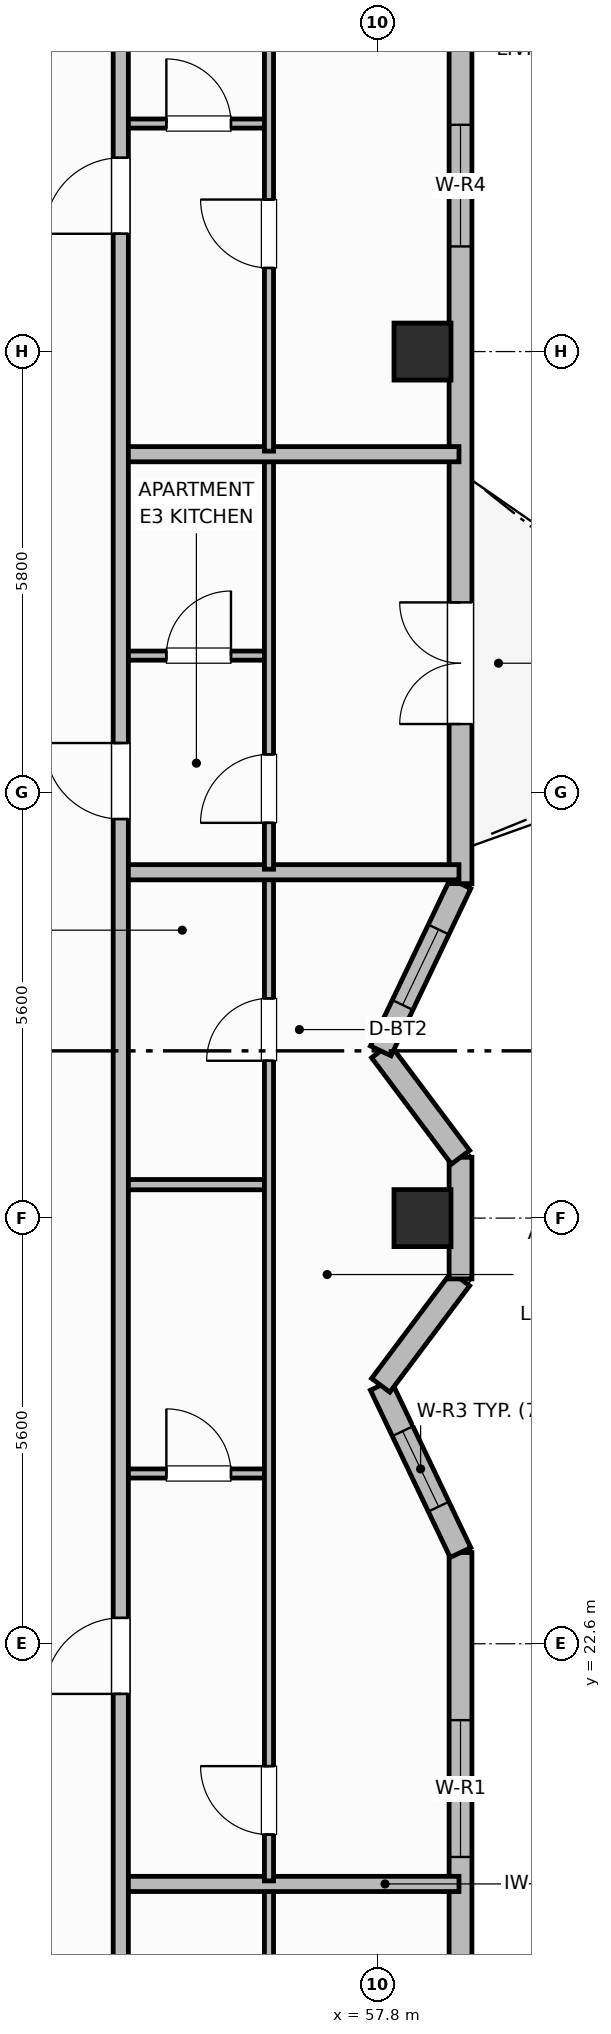
"""IFC4 building model, lengths in metres.
Left out: names, types, materials, properties, quantities, classifications, styles, units other than length and angle.
Written with IfcOpenShell. Run it as: python <this file> out.ifc"""

import sys

from ifc_helpers import new_model, si_unit, direction, frame, frame_2d, origin, origin_2d, place, context, subcontext, project, spatial, rectangle, extrude, element, fill, save


model = new_model("IFC4")
c1 = context("Model", 3, precision=1e-05, world=origin(), true_north=direction((0.0, 1.0)))
c2 = subcontext(c1, "Body", "Model", "MODEL_VIEW")
j1 = project(units=[si_unit("LENGTHUNIT", "METRE"), si_unit("PLANEANGLEUNIT", "RADIAN")], contexts=[c1])
p1 = place(None, origin())
s1 = spatial("IfcSite", under=j1, at=p1, CompositionType="ELEMENT")
p2 = place(p1, origin())
s2 = spatial("IfcBuilding", under=s1, at=p2, CompositionType="ELEMENT")
p3 = place(p2, frame((0.0, 0.0, 275.0)))
s3 = spatial("IfcBuildingStorey", under=s2, at=p3, CompositionType="ELEMENT", Elevation=275.0)
for number, where, z_axis, x_axis in (
    (1, (58.39, 28.2, 0.0), (0.0, 0.0, 1.0), (1.0, 0.0, 0.0)),
    (2, (58.39, 39.6, 0.0), (0.0, 0.0, 1.0), (1.0, 0.0, 0.0)),
):
    element("IfcColumn", number, at=place(p3, frame(where, z_axis=z_axis, x_axis=x_axis)), inside=s3, PredefinedType="COLUMN", context=c2, shape_type="SweptSolid", body=[
        extrude(rectangle(XDim=0.75, YDim=0.75, at=origin_2d()), origin(), (0.0, 0.0, 1.0), 3.7),
    ])
p4 = place(p3, frame((58.89, 12.68, 0.0), z_axis=(0.0, 0.0, 1.0), x_axis=(0.0, 1.0, 0.0)))
e3 = element("IfcWall", 3, at=p4, inside=s3, PredefinedType="SOLIDWALL", context=c2, shape_type="SweptSolid", body=[
    extrude(rectangle(XDim=11.12, YDim=0.3, at=frame_2d((5.56, 0.0))), origin(), (0.0, 0.0, 1.0), 2.73),
])
p5 = place(p4, frame((1.32, 0.0, 0.72)))
e4 = element("IfcOpeningElement", 4, at=p5, cuts=e3, PredefinedType="OPENING", context=c2, shape_type="SweptSolid", body=[
    extrude(rectangle(XDim=1.4, YDim=1.85, at=frame_2d((0.7, 0.925))), frame((0.0, 0.16, 0.0), z_axis=(0.0, -1.0, 0.0), x_axis=(1.0, 0.0, 0.0)), (0.0, 0.0, 1.0), 0.32),
])
p6 = place(p4, frame((7.115, 0.0, 0.76)))
e5 = element("IfcOpeningElement", 5, at=p6, cuts=e3, PredefinedType="OPENING", context=c2, shape_type="SweptSolid", body=[
    extrude(rectangle(XDim=1.8, YDim=1.85, at=frame_2d((0.9, 0.925))), frame((0.0, 0.16, 0.0), z_axis=(0.0, -1.0, 0.0), x_axis=(1.0, 0.0, 0.0)), (0.0, 0.0, 1.0), 0.32),
])
p7 = place(p3, frame((58.89, 23.8, 0.0), z_axis=(0.0, 0.0, 1.0), x_axis=(-0.430672112392, 0.902508466225, 0.0)))
e6 = element("IfcWall", 6, at=p7, inside=s3, PredefinedType="SOLIDWALL", context=c2, shape_type="SweptSolid", body=[
    extrude(rectangle(XDim=2.438, YDim=0.3, at=frame_2d((1.219, 0.0))), origin(), (0.0, 0.0, 1.0), 2.73),
])
p8 = place(p7, frame((0.669, 0.0, 0.92)))
e7 = element("IfcOpeningElement", 7, at=p8, cuts=e6, PredefinedType="OPENING", context=c2, shape_type="SweptSolid", body=[
    extrude(rectangle(XDim=1.1, YDim=1.65, at=frame_2d((0.55, 0.825))), frame((0.0, 0.16, 0.0), z_axis=(0.0, -1.0, 0.0), x_axis=(1.0, 0.0, 0.0)), (0.0, 0.0, 1.0), 0.32),
])
p9 = place(p3, frame((57.84, 26.0, 0.0), z_axis=(0.0, 0.0, 1.0), x_axis=(0.599955351225, 0.800033484634, 0.0)))
e8 = element("IfcWall", 8, at=p9, inside=s3, PredefinedType="SOLIDWALL", context=c2, shape_type="SweptSolid", body=[
    extrude(rectangle(XDim=1.75, YDim=0.3, at=frame_2d((0.875, 0.0))), origin(), (0.0, 0.0, 1.0), 2.73),
])
p10 = place(p3, frame((58.89, 27.4, 0.0), z_axis=(0.0, 0.0, 1.0), x_axis=(0.0, 1.0, 0.0)))
e9 = element("IfcWall", 9, at=p10, inside=s3, PredefinedType="SOLIDWALL", context=c2, shape_type="SweptSolid", body=[
    extrude(rectangle(XDim=1.6, YDim=0.3, at=frame_2d((0.8, 0.0))), origin(), (0.0, 0.0, 1.0), 2.73),
])
p11 = place(p3, frame((58.89, 29.0, 0.0), z_axis=(0.0, 0.0, 1.0), x_axis=(-0.599955351225, 0.800033484634, 0.0)))
e10 = element("IfcWall", 10, at=p11, inside=s3, PredefinedType="SOLIDWALL", context=c2, shape_type="SweptSolid", body=[
    extrude(rectangle(XDim=1.75, YDim=0.3, at=frame_2d((0.875, 0.0))), origin(), (0.0, 0.0, 1.0), 2.73),
])
p12 = place(p3, frame((57.84, 30.4, 0.0), z_axis=(0.0, 0.0, 1.0), x_axis=(0.430633186234, 0.902527040544, 0.0)))
e11 = element("IfcWall", 11, at=p12, inside=s3, PredefinedType="SOLIDWALL", context=c2, shape_type="SweptSolid", body=[
    extrude(rectangle(XDim=2.438, YDim=0.3, at=frame_2d((1.219, 0.0))), origin(), (0.0, 0.0, 1.0), 2.73),
])
p13 = place(p12, frame((0.669, 0.0, 0.92)))
e12 = element("IfcOpeningElement", 12, at=p13, cuts=e11, PredefinedType="OPENING", context=c2, shape_type="SweptSolid", body=[
    extrude(rectangle(XDim=1.1, YDim=1.65, at=frame_2d((0.55, 0.825))), frame((0.0, 0.16, 0.0), z_axis=(0.0, -1.0, 0.0), x_axis=(1.0, 0.0, 0.0)), (0.0, 0.0, 1.0), 0.32),
])
p14 = place(p3, frame((58.89, 32.6, 0.0), z_axis=(0.0, 0.0, 1.0), x_axis=(0.0, 1.0, 0.0)))
e13 = element("IfcWall", 13, at=p14, inside=s3, PredefinedType="SOLIDWALL", context=c2, shape_type="SweptSolid", body=[
    extrude(rectangle(XDim=11.12, YDim=0.3, at=frame_2d((5.56, 0.0))), origin(), (0.0, 0.0, 1.0), 2.73),
])
p15 = place(p14, frame((2.1, 0.0, 0.0)))
e14 = element("IfcOpeningElement", 14, at=p15, cuts=e13, PredefinedType="OPENING", context=c2, shape_type="SweptSolid", body=[
    extrude(rectangle(XDim=1.6, YDim=2.1, at=frame_2d((0.8, 1.05))), frame((0.0, 0.16, 0.0), z_axis=(0.0, -1.0, 0.0), x_axis=(1.0, 0.0, 0.0)), (0.0, 0.0, 1.0), 0.32),
])
p16 = place(p14, frame((8.383, 0.0, 0.71)))
e15 = element("IfcOpeningElement", 15, at=p16, cuts=e13, PredefinedType="OPENING", context=c2, shape_type="SweptSolid", body=[
    extrude(rectangle(XDim=1.6, YDim=1.9, at=frame_2d((0.8, 0.95))), frame((0.0, 0.16, 0.0), z_axis=(0.0, -1.0, 0.0), x_axis=(1.0, 0.0, 0.0)), (0.0, 0.0, 1.0), 0.32),
])
p17 = place(p3, frame((56.37, 9.99, 0.0), z_axis=(0.0, 0.0, 1.0), x_axis=(0.0, 1.0, 0.0)))
e16 = element("IfcWall", 16, at=p17, inside=s3, PredefinedType="PARTITIONING", context=c2, shape_type="SweptSolid", body=[
    extrude(rectangle(XDim=9.41, YDim=0.12, at=frame_2d((4.705, 0.0))), origin(), (0.0, 0.0, 1.0), 2.56),
])
p18 = place(p17, frame((0.41, 0.0, 0.0)))
e17 = element("IfcOpeningElement", 17, at=p18, cuts=e16, PredefinedType="OPENING", context=c2, shape_type="SweptSolid", body=[
    extrude(rectangle(XDim=0.9, YDim=2.1, at=frame_2d((0.45, 1.05))), frame((0.0, 0.07, 0.0), z_axis=(0.0, -1.0, 0.0), x_axis=(1.0, 0.0, 0.0)), (0.0, 0.0, 1.0), 0.14),
])
p19 = place(p3, frame((54.42, 19.44, 0.0), z_axis=(0.0, 0.0, 1.0), x_axis=(1.0, 0.0, 0.0)))
e18 = element("IfcWall", 18, at=p19, inside=s3, PredefinedType="PARTITIONING", context=c2, shape_type="SweptSolid", body=[
    extrude(rectangle(XDim=4.45, YDim=0.2, at=frame_2d((2.225, 0.0))), origin(), (0.0, 0.0, 1.0), 2.56),
])
p20 = place(p3, frame((54.42, 24.84, 0.0), z_axis=(0.0, 0.0, 1.0), x_axis=(1.0, 0.0, 0.0)))
e19 = element("IfcWall", 19, at=p20, inside=s3, PredefinedType="PARTITIONING", context=c2, shape_type="SweptSolid", body=[
    extrude(rectangle(XDim=1.95, YDim=0.12, at=frame_2d((0.975, 0.0))), origin(), (0.0, 0.0, 1.0), 2.56),
])
p21 = place(p20, frame((0.6, 0.0, 0.0)))
e20 = element("IfcOpeningElement", 20, at=p21, cuts=e19, PredefinedType="OPENING", context=c2, shape_type="SweptSolid", body=[
    extrude(rectangle(XDim=0.85, YDim=2.1, at=frame_2d((0.425, 1.05))), frame((0.0, 0.07, 0.0), z_axis=(0.0, -1.0, 0.0), x_axis=(1.0, 0.0, 0.0)), (0.0, 0.0, 1.0), 0.14),
])
p22 = place(p3, frame((54.42, 28.64, 0.0), z_axis=(0.0, 0.0, 1.0), x_axis=(1.0, 0.0, 0.0)))
e21 = element("IfcWall", 21, at=p22, inside=s3, PredefinedType="PARTITIONING", context=c2, shape_type="SweptSolid", body=[
    extrude(rectangle(XDim=1.95, YDim=0.135, at=frame_2d((0.975, 0.0))), origin(), (0.0, 0.0, 1.0), 2.56),
])
p23 = place(p3, frame((56.37, 19.48, 0.0), z_axis=(0.0, 0.0, 1.0), x_axis=(0.0, 1.0, 0.0)))
e22 = element("IfcWall", 22, at=p23, inside=s3, PredefinedType="PARTITIONING", context=c2, shape_type="SweptSolid", body=[
    extrude(rectangle(XDim=13.23, YDim=0.12, at=frame_2d((6.615, 0.0))), origin(), (0.0, 0.0, 1.0), 2.56),
])
p24 = place(p23, frame((0.61, 0.0, 0.0)))
e23 = element("IfcOpeningElement", 23, at=p24, cuts=e22, PredefinedType="OPENING", context=c2, shape_type="SweptSolid", body=[
    extrude(rectangle(XDim=0.9, YDim=2.1, at=frame_2d((0.45, 1.05))), frame((0.0, 0.07, 0.0), z_axis=(0.0, -1.0, 0.0), x_axis=(1.0, 0.0, 0.0)), (0.0, 0.0, 1.0), 0.14),
])
p25 = place(p23, frame((10.79, 0.0, 0.0)))
e24 = element("IfcOpeningElement", 24, at=p25, cuts=e22, PredefinedType="OPENING", context=c2, shape_type="SweptSolid", body=[
    extrude(rectangle(XDim=0.82, YDim=2.08, at=frame_2d((0.41, 1.04))), frame((0.0, 0.07, 0.0), z_axis=(0.0, -1.0, 0.0), x_axis=(1.0, 0.0, 0.0)), (0.0, 0.0, 1.0), 0.14),
])
p26 = place(p3, frame((54.42, 32.75, 0.0), z_axis=(0.0, 0.0, 1.0), x_axis=(1.0, 0.0, 0.0)))
e25 = element("IfcWall", 25, at=p26, inside=s3, PredefinedType="PARTITIONING", context=c2, shape_type="SweptSolid", body=[
    extrude(rectangle(XDim=4.45, YDim=0.2, at=frame_2d((2.225, 0.0))), origin(), (0.0, 0.0, 1.0), 2.56),
])
p27 = place(p3, frame((54.42, 35.6, 0.0), z_axis=(0.0, 0.0, 1.0), x_axis=(1.0, 0.0, 0.0)))
e26 = element("IfcWall", 26, at=p27, inside=s3, PredefinedType="PARTITIONING", context=c2, shape_type="SweptSolid", body=[
    extrude(rectangle(XDim=1.95, YDim=0.12, at=frame_2d((0.975, 0.0))), origin(), (0.0, 0.0, 1.0), 2.56),
])
p28 = place(p27, frame((0.6, 0.0, 0.0)))
e27 = element("IfcOpeningElement", 27, at=p28, cuts=e26, PredefinedType="OPENING", context=c2, shape_type="SweptSolid", body=[
    extrude(rectangle(XDim=0.85, YDim=2.1, at=frame_2d((0.425, 1.05))), frame((0.0, 0.07, 0.0), z_axis=(0.0, -1.0, 0.0), x_axis=(1.0, 0.0, 0.0)), (0.0, 0.0, 1.0), 0.14),
])
p29 = place(p3, frame((56.37, 32.79, 0.0), z_axis=(0.0, 0.0, 1.0), x_axis=(0.0, 1.0, 0.0)))
e28 = element("IfcWall", 28, at=p29, inside=s3, PredefinedType="PARTITIONING", context=c2, shape_type="SweptSolid", body=[
    extrude(rectangle(XDim=5.42, YDim=0.12, at=frame_2d((2.71, 0.0))), origin(), (0.0, 0.0, 1.0), 2.56),
])
p30 = place(p29, frame((0.61, 0.0, 0.0)))
e29 = element("IfcOpeningElement", 29, at=p30, cuts=e28, PredefinedType="OPENING", context=c2, shape_type="SweptSolid", body=[
    extrude(rectangle(XDim=0.9, YDim=2.1, at=frame_2d((0.45, 1.05))), frame((0.0, 0.07, 0.0), z_axis=(0.0, -1.0, 0.0), x_axis=(1.0, 0.0, 0.0)), (0.0, 0.0, 1.0), 0.14),
])
p31 = place(p3, frame((54.42, 38.25, 0.0), z_axis=(0.0, 0.0, 1.0), x_axis=(1.0, 0.0, 0.0)))
e30 = element("IfcWall", 30, at=p31, inside=s3, PredefinedType="PARTITIONING", context=c2, shape_type="SweptSolid", body=[
    extrude(rectangle(XDim=4.45, YDim=0.2, at=frame_2d((2.225, 0.0))), origin(), (0.0, 0.0, 1.0), 2.56),
])
p32 = place(p3, frame((54.42, 42.6, 0.0), z_axis=(0.0, 0.0, 1.0), x_axis=(1.0, 0.0, 0.0)))
e31 = element("IfcWall", 31, at=p32, inside=s3, PredefinedType="PARTITIONING", context=c2, shape_type="SweptSolid", body=[
    extrude(rectangle(XDim=1.95, YDim=0.12, at=frame_2d((0.975, 0.0))), origin(), (0.0, 0.0, 1.0), 2.56),
])
p33 = place(p32, frame((0.6, 0.0, 0.0)))
e32 = element("IfcOpeningElement", 32, at=p33, cuts=e31, PredefinedType="OPENING", context=c2, shape_type="SweptSolid", body=[
    extrude(rectangle(XDim=0.85, YDim=2.1, at=frame_2d((0.425, 1.05))), frame((0.0, 0.07, 0.0), z_axis=(0.0, -1.0, 0.0), x_axis=(1.0, 0.0, 0.0)), (0.0, 0.0, 1.0), 0.14),
])
p34 = place(p3, frame((56.37, 38.29, 0.0), z_axis=(0.0, 0.0, 1.0), x_axis=(0.0, 1.0, 0.0)))
e33 = element("IfcWall", 33, at=p34, inside=s3, PredefinedType="PARTITIONING", context=c2, shape_type="SweptSolid", body=[
    extrude(rectangle(XDim=8.12, YDim=0.12, at=frame_2d((4.06, 0.0))), origin(), (0.0, 0.0, 1.0), 2.56),
])
p35 = place(p34, frame((2.41, 0.0, 0.0)))
e34 = element("IfcOpeningElement", 34, at=p35, cuts=e33, PredefinedType="OPENING", context=c2, shape_type="SweptSolid", body=[
    extrude(rectangle(XDim=0.9, YDim=2.1, at=frame_2d((0.45, 1.05))), frame((0.0, 0.07, 0.0), z_axis=(0.0, -1.0, 0.0), x_axis=(1.0, 0.0, 0.0)), (0.0, 0.0, 1.0), 0.14),
])
p36 = place(p3, frame((54.42, 9.95, 0.0), z_axis=(0.0, 0.0, 1.0), x_axis=(0.0, 1.0, 0.0)))
e35 = element("IfcWall", 35, at=p36, inside=s3, PredefinedType="PARTITIONING", context=c2, shape_type="SweptSolid", body=[
    extrude(rectangle(XDim=36.5, YDim=0.2, at=frame_2d((18.25, 0.0))), origin(), (0.0, 0.0, 1.0), 2.56),
])
p37 = place(p36, frame((3.11, 0.0, 0.0)))
e36 = element("IfcOpeningElement", 36, at=p37, cuts=e35, PredefinedType="OPENING", context=c2, shape_type="SweptSolid", body=[
    extrude(rectangle(XDim=1.0, YDim=2.15, at=frame_2d((0.5, 1.075))), frame((0.0, 0.11, 0.0), z_axis=(0.0, -1.0, 0.0), x_axis=(1.0, 0.0, 0.0)), (0.0, 0.0, 1.0), 0.22),
])
p38 = place(p36, frame((11.99, 0.0, 0.0)))
e37 = element("IfcOpeningElement", 37, at=p38, cuts=e35, PredefinedType="OPENING", context=c2, shape_type="SweptSolid", body=[
    extrude(rectangle(XDim=1.0, YDim=2.15, at=frame_2d((0.5, 1.075))), frame((0.0, 0.11, 0.0), z_axis=(0.0, -1.0, 0.0), x_axis=(1.0, 0.0, 0.0)), (0.0, 0.0, 1.0), 0.22),
])
p39 = place(p36, frame((23.5, 0.0, 0.0)))
e38 = element("IfcOpeningElement", 38, at=p39, cuts=e35, PredefinedType="OPENING", context=c2, shape_type="SweptSolid", body=[
    extrude(rectangle(XDim=1.0, YDim=2.15, at=frame_2d((0.5, 1.075))), frame((0.0, 0.11, 0.0), z_axis=(0.0, -1.0, 0.0), x_axis=(1.0, 0.0, 0.0)), (0.0, 0.0, 1.0), 0.22),
])
p40 = place(p36, frame((31.2, 0.0, 0.0)))
e39 = element("IfcOpeningElement", 39, at=p40, cuts=e35, PredefinedType="OPENING", context=c2, shape_type="SweptSolid", body=[
    extrude(rectangle(XDim=1.0, YDim=2.15, at=frame_2d((0.5, 1.075))), frame((0.0, 0.11, 0.0), z_axis=(0.0, -1.0, 0.0), x_axis=(1.0, 0.0, 0.0)), (0.0, 0.0, 1.0), 0.22),
])
p41 = place(p6, origin())
e40 = element("IfcWindow", 40, at=p41, inside=s3, PartitioningType="SINGLE_PANEL", PredefinedType="WINDOW", context=c2, shape_type="SweptSolid", body=[
    extrude(rectangle(XDim=1.8, YDim=1.85, at=frame_2d((0.9, 0.925))), frame((0.0, 0.03, 0.0), z_axis=(0.0, -1.0, 0.0), x_axis=(1.0, 0.0, 0.0)), (0.0, 0.0, 1.0), 0.06),
])
fill(e5, e40)
p42 = place(p8, origin())
e41 = element("IfcWindow", 41, at=p42, inside=s3, PartitioningType="SINGLE_PANEL", PredefinedType="WINDOW", context=c2, shape_type="SweptSolid", body=[
    extrude(rectangle(XDim=1.1, YDim=1.65, at=frame_2d((0.55, 0.825))), frame((0.0, 0.03, 0.0), z_axis=(0.0, -1.0, 0.0), x_axis=(1.0, 0.0, 0.0)), (0.0, 0.0, 1.0), 0.06),
])
fill(e7, e41)
p43 = place(p13, origin())
e42 = element("IfcWindow", 42, at=p43, inside=s3, PartitioningType="SINGLE_PANEL", PredefinedType="WINDOW", context=c2, shape_type="SweptSolid", body=[
    extrude(rectangle(XDim=1.1, YDim=1.65, at=frame_2d((0.55, 0.825))), frame((0.0, 0.03, 0.0), z_axis=(0.0, -1.0, 0.0), x_axis=(1.0, 0.0, 0.0)), (0.0, 0.0, 1.0), 0.06),
])
fill(e12, e42)
p44 = place(p15, origin())
e43 = element("IfcDoor", 43, at=p44, inside=s3, OperationType="DOUBLE_DOOR_SINGLE_SWING", PredefinedType="DOOR", context=c2, shape_type="SweptSolid", body=[
    extrude(rectangle(XDim=1.6, YDim=2.1, at=frame_2d((0.8, 1.05))), frame((0.0, 0.025, 0.0), z_axis=(0.0, -1.0, 0.0), x_axis=(1.0, 0.0, 0.0)), (0.0, 0.0, 1.0), 0.05),
])
fill(e14, e43)
p45 = place(p16, origin())
e44 = element("IfcWindow", 44, at=p45, inside=s3, PartitioningType="SINGLE_PANEL", PredefinedType="WINDOW", context=c2, shape_type="SweptSolid", body=[
    extrude(rectangle(XDim=1.6, YDim=1.9, at=frame_2d((0.8, 0.95))), frame((0.0, 0.03, 0.0), z_axis=(0.0, -1.0, 0.0), x_axis=(1.0, 0.0, 0.0)), (0.0, 0.0, 1.0), 0.06),
])
fill(e15, e44)
p46 = place(p21, origin())
e45 = element("IfcDoor", 45, at=p46, inside=s3, OperationType="SINGLE_SWING_LEFT", PredefinedType="DOOR", context=c2, shape_type="SweptSolid", body=[
    extrude(rectangle(XDim=0.85, YDim=2.1, at=frame_2d((0.425, 1.05))), frame((0.0, 0.025, 0.0), z_axis=(0.0, -1.0, 0.0), x_axis=(1.0, 0.0, 0.0)), (0.0, 0.0, 1.0), 0.05),
])
fill(e20, e45)
p47 = place(p24, origin())
e46 = element("IfcDoor", 46, at=p47, inside=s3, OperationType="SINGLE_SWING_RIGHT", PredefinedType="DOOR", context=c2, shape_type="SweptSolid", body=[
    extrude(rectangle(XDim=0.9, YDim=2.1, at=frame_2d((0.45, 1.05))), frame((0.0, 0.025, 0.0), z_axis=(0.0, -1.0, 0.0), x_axis=(1.0, 0.0, 0.0)), (0.0, 0.0, 1.0), 0.05),
])
fill(e23, e46)
p48 = place(p25, origin())
e47 = element("IfcDoor", 47, at=p48, inside=s3, OperationType="SINGLE_SWING_LEFT", PredefinedType="DOOR", context=c2, shape_type="SweptSolid", body=[
    extrude(rectangle(XDim=0.82, YDim=2.08, at=frame_2d((0.41, 1.04))), frame((0.0, 0.025, 0.0), z_axis=(0.0, -1.0, 0.0), x_axis=(1.0, 0.0, 0.0)), (0.0, 0.0, 1.0), 0.05),
])
fill(e24, e47)
p49 = place(p28, origin())
e48 = element("IfcDoor", 48, at=p49, inside=s3, OperationType="SINGLE_SWING_RIGHT", PredefinedType="DOOR", context=c2, shape_type="SweptSolid", body=[
    extrude(rectangle(XDim=0.85, YDim=2.1, at=frame_2d((0.425, 1.05))), frame((0.0, 0.025, 0.0), z_axis=(0.0, -1.0, 0.0), x_axis=(1.0, 0.0, 0.0)), (0.0, 0.0, 1.0), 0.05),
])
fill(e27, e48)
p50 = place(p30, origin())
e49 = element("IfcDoor", 49, at=p50, inside=s3, OperationType="SINGLE_SWING_LEFT", PredefinedType="DOOR", context=c2, shape_type="SweptSolid", body=[
    extrude(rectangle(XDim=0.9, YDim=2.1, at=frame_2d((0.45, 1.05))), frame((0.0, 0.025, 0.0), z_axis=(0.0, -1.0, 0.0), x_axis=(1.0, 0.0, 0.0)), (0.0, 0.0, 1.0), 0.05),
])
fill(e29, e49)
p51 = place(p33, origin())
e50 = element("IfcDoor", 50, at=p51, inside=s3, OperationType="SINGLE_SWING_LEFT", PredefinedType="DOOR", context=c2, shape_type="SweptSolid", body=[
    extrude(rectangle(XDim=0.85, YDim=2.1, at=frame_2d((0.425, 1.05))), frame((0.0, 0.025, 0.0), z_axis=(0.0, -1.0, 0.0), x_axis=(1.0, 0.0, 0.0)), (0.0, 0.0, 1.0), 0.05),
])
fill(e32, e50)
p52 = place(p35, origin())
e51 = element("IfcDoor", 51, at=p52, inside=s3, OperationType="SINGLE_SWING_RIGHT", PredefinedType="DOOR", context=c2, shape_type="SweptSolid", body=[
    extrude(rectangle(XDim=0.9, YDim=2.1, at=frame_2d((0.45, 1.05))), frame((0.0, 0.025, 0.0), z_axis=(0.0, -1.0, 0.0), x_axis=(1.0, 0.0, 0.0)), (0.0, 0.0, 1.0), 0.05),
])
fill(e34, e51)
p53 = place(p38, origin())
e52 = element("IfcDoor", 52, at=p53, inside=s3, OperationType="SINGLE_SWING_LEFT", PredefinedType="DOOR", context=c2, shape_type="SweptSolid", body=[
    extrude(rectangle(XDim=1.0, YDim=2.15, at=frame_2d((0.5, 1.075))), frame((0.0, 0.025, 0.0), z_axis=(0.0, -1.0, 0.0), x_axis=(1.0, 0.0, 0.0)), (0.0, 0.0, 1.0), 0.05),
])
fill(e37, e52)
p54 = place(p39, origin())
e53 = element("IfcDoor", 53, at=p54, inside=s3, OperationType="SINGLE_SWING_RIGHT", PredefinedType="DOOR", context=c2, shape_type="SweptSolid", body=[
    extrude(rectangle(XDim=1.0, YDim=2.15, at=frame_2d((0.5, 1.075))), frame((0.0, 0.025, 0.0), z_axis=(0.0, -1.0, 0.0), x_axis=(1.0, 0.0, 0.0)), (0.0, 0.0, 1.0), 0.05),
])
fill(e38, e53)
p55 = place(p40, origin())
e54 = element("IfcDoor", 54, at=p55, inside=s3, OperationType="SINGLE_SWING_LEFT", PredefinedType="DOOR", context=c2, shape_type="SweptSolid", body=[
    extrude(rectangle(XDim=1.0, YDim=2.15, at=frame_2d((0.5, 1.075))), frame((0.0, 0.025, 0.0), z_axis=(0.0, -1.0, 0.0), x_axis=(1.0, 0.0, 0.0)), (0.0, 0.0, 1.0), 0.05),
])
fill(e39, e54)
save(model, sys.argv[1])
